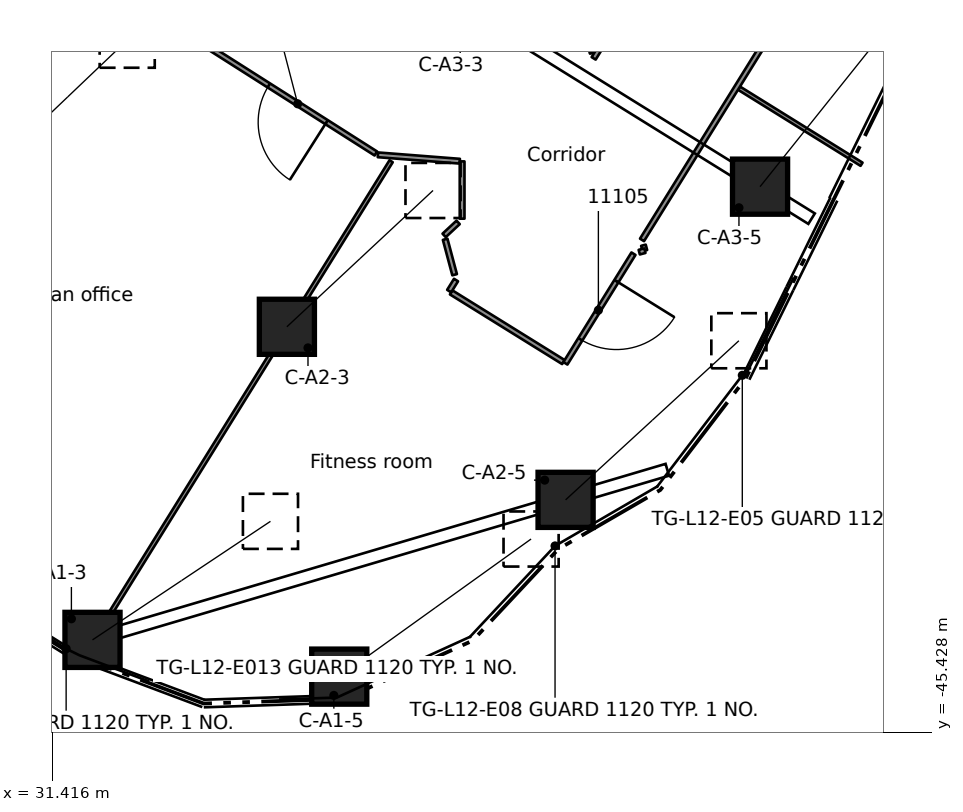
"""IFC4 building model, lengths in metres.
Left out: names, types, materials, properties, quantities, classifications, styles, units other than length and angle.
Written with IfcOpenShell. Run it as: python <this file> out.ifc"""

import sys

from ifc_helpers import new_model, si_unit, direction, frame, frame_2d, origin, origin_2d, place, context, subcontext, project, spatial, rectangle, extrude, element, fill, save


model = new_model("IFC4")
c1 = context("Model", 3, precision=1e-05, world=origin(), true_north=direction((0.0, 1.0)))
c2 = subcontext(c1, "Body", "Model", "MODEL_VIEW")
j1 = project(units=[si_unit("LENGTHUNIT", "METRE"), si_unit("PLANEANGLEUNIT", "RADIAN")], contexts=[c1])
p1 = place(None, origin())
s1 = spatial("IfcSite", under=j1, at=p1, CompositionType="ELEMENT")
p2 = place(p1, origin())
s2 = spatial("IfcBuilding", under=s1, at=p2, CompositionType="ELEMENT")
p3 = place(p2, frame((0.0, 0.0, 54.8)))
s3 = spatial("IfcBuildingStorey", under=s2, at=p3, CompositionType="ELEMENT", Elevation=54.8)
p4 = place(p3, frame((32.475, -42.992, 0.654), z_axis=(0.750792181677, 0.500045363689, 0.431585141294), x_axis=(-0.55432964242, 0.832297211058, 0.0)))
e1 = element("IfcColumn", 1, at=p4, inside=s3, PredefinedType="COLUMN", context=c2, shape_type="SweptSolid", body=[
    extrude(rectangle(XDim=1.45, YDim=1.45, at=origin_2d()), origin(), (0.0, 0.0, 1.0), 6.237),
])
p5 = place(p3, frame((38.968, -43.959, 0.666), z_axis=(0.746649911679, 0.535585988781, 0.394539678628), x_axis=(-0.58286895682, 0.812566169106, 0.0)))
e2 = element("IfcColumn", 2, at=p5, inside=s3, PredefinedType="COLUMN", context=c2, shape_type="SweptSolid", body=[
    extrude(rectangle(XDim=1.45, YDim=1.45, at=origin_2d()), origin(), (0.0, 0.0, 1.0), 6.761),
])
p6 = place(p3, frame((30.255, -30.2, 0.61), z_axis=(0.608996447685, 0.580618057931, 0.540375792862), x_axis=(-0.690042356189, 0.723768987084, 0.0)))
e3 = element("IfcColumn", 3, at=p6, inside=s3, PredefinedType="COLUMN", context=c2, shape_type="SweptSolid", body=[
    extrude(rectangle(XDim=1.45, YDim=1.45, at=origin_2d()), origin(), (0.0, 0.0, 1.0), 5.145),
])
p7 = place(p3, frame((37.59, -34.754, 0.644), z_axis=(0.650011603321, 0.606231859074, 0.45822248809), x_axis=(-0.682050250906, 0.731305309183, 0.0)))
e4 = element("IfcColumn", 4, at=p7, inside=s3, PredefinedType="COLUMN", context=c2, shape_type="SweptSolid", body=[
    extrude(rectangle(XDim=1.45, YDim=1.45, at=origin_2d()), origin(), (0.0, 0.0, 1.0), 5.917),
])
p8 = place(p3, frame((44.924, -39.308, 0.666), z_axis=(0.676410943669, 0.621108726451, 0.395843637324), x_axis=(-0.676354787689, 0.736575998231, 0.0)))
e5 = element("IfcColumn", 5, at=p8, inside=s3, PredefinedType="COLUMN", context=c2, shape_type="SweptSolid", body=[
    extrude(rectangle(XDim=1.45, YDim=1.45, at=origin_2d()), origin(), (0.0, 0.0, 1.0), 6.741),
])
p9 = place(p3, frame((27.423, -28.442, 0.609), z_axis=(0.69676588464, 0.469082356893, 0.542659234192), x_axis=(-0.558462658867, 0.829529661104, 0.0)))
e6 = element("IfcColumn", 6, at=p9, inside=s3, PredefinedType="COLUMN", context=c2, shape_type="SweptSolid", body=[
    extrude(rectangle(XDim=1.45, YDim=1.45, at=origin_2d()), origin(), (0.0, 0.0, 1.0), 5.126),
])
p10 = place(p3, frame((50.041, -31.067, 0.661), z_axis=(0.569633877133, 0.712332079471, 0.410000310463), x_axis=(-0.780992758951, 0.624540079151, 0.0)))
e7 = element("IfcColumn", 7, at=p10, inside=s3, PredefinedType="COLUMN", context=c2, shape_type="SweptSolid", body=[
    extrude(rectangle(XDim=1.45, YDim=1.45, at=origin_2d()), origin(), (0.0, 0.0, 1.0), 6.531),
])
p11 = place(p3, frame((41.755, -32.451, 0.0), z_axis=(0.0, 0.0, 1.0), x_axis=(0.257851455591, -0.966184571834, 0.0)))
e8 = element("IfcWall", 8, at=p11, inside=s3, PredefinedType="PARTITIONING", context=c2, shape_type="SweptSolid", body=[
    extrude(rectangle(XDim=0.966, YDim=0.125, at=frame_2d((0.483, 0.0))), origin(), (0.0, 0.0, 1.0), 3.58),
])
p12 = place(p3, frame((45.51, -27.123, 0.0), z_axis=(0.0, 0.0, 1.0), x_axis=(0.259479518398, -0.96574861094, 0.0)))
e9 = element("IfcWall", 9, at=p12, inside=s3, PredefinedType="PARTITIONING", context=c2, shape_type="SweptSolid", body=[
    extrude(rectangle(XDim=0.443, YDim=0.125, at=frame_2d((0.222, 0.0))), origin(), (0.0, 0.0, 1.0), 3.58),
])
p13 = place(p3, frame((46.972, -32.608, 0.0), z_axis=(0.0, 0.0, 1.0), x_axis=(0.258901994846, -0.965903596155, 0.0)))
e10 = element("IfcWall", 10, at=p13, inside=s3, PredefinedType="PARTITIONING", context=c2, shape_type="SweptSolid", body=[
    extrude(rectangle(XDim=0.147, YDim=0.125, at=frame_2d((0.074, 0.0))), origin(), (0.0, 0.0, 1.0), 3.58),
])
p14 = place(p3, frame((39.932, -30.195, 0.0), z_axis=(0.0, 0.0, 1.0), x_axis=(-0.843820070804, 0.536626208927, 0.0)))
e11 = element("IfcWall", 11, at=p14, inside=s3, PredefinedType="PARTITIONING", context=c2, shape_type="SweptSolid", body=[
    extrude(rectangle(XDim=6.464, YDim=0.125, at=frame_2d((3.232, 0.0))), origin(), (0.0, 0.0, 1.0), 3.58),
])
p15 = place(p14, frame((1.538, 0.0, 0.0)))
e12 = element("IfcOpeningElement", 12, at=p15, cuts=e11, PredefinedType="OPENING", context=c2, shape_type="SweptSolid", body=[
    extrude(rectangle(XDim=1.8, YDim=2.1, at=frame_2d((0.9, 1.05))), frame((0.0, 0.073, 0.0), z_axis=(0.0, -1.0, 0.0), x_axis=(1.0, 0.0, 0.0)), (0.0, 0.0, 1.0), 0.145),
])
p16 = place(p3, frame((41.913, -33.849, 0.0), z_axis=(0.0, 0.0, 1.0), x_axis=(0.849647763732, -0.527350621111, 0.0)))
e13 = element("IfcWall", 13, at=p16, inside=s3, PredefinedType="PARTITIONING", context=c2, shape_type="SweptSolid", body=[
    extrude(rectangle(XDim=3.475, YDim=0.125, at=frame_2d((1.738, 0.0))), origin(), (0.0, 0.0, 1.0), 3.58),
])
p17 = place(p3, frame((49.487, -28.475, 0.0), z_axis=(0.0, 0.0, 1.0), x_axis=(0.849602400196, -0.527423702143, 0.0)))
e14 = element("IfcWall", 14, at=p17, inside=s3, PredefinedType="PARTITIONING", context=c2, shape_type="SweptSolid", body=[
    extrude(rectangle(XDim=3.796, YDim=0.1, at=frame_2d((1.898, 0.0))), origin(), (0.0, 0.0, 1.0), 3.58),
])
p18 = place(p3, frame((39.985, -30.229, 0.0), z_axis=(0.0, 0.0, 1.0), x_axis=(0.996972826888, -0.077750771356, 0.0)))
e15 = element("IfcWall", 15, at=p18, inside=s3, PredefinedType="PARTITIONING", context=c2, shape_type="SweptSolid", body=[
    extrude(rectangle(XDim=2.16, YDim=0.125, at=frame_2d((1.08, 0.0))), origin(), (0.0, 0.0, 1.0), 3.58),
])
p19 = place(p3, frame((46.862, -32.79, 0.0), z_axis=(0.0, 0.0, 1.0), x_axis=(0.96686754856, 0.255278560676, 0.0)))
e16 = element("IfcWall", 16, at=p19, inside=s3, PredefinedType="PARTITIONING", context=c2, shape_type="SweptSolid", body=[
    extrude(rectangle(XDim=0.153, YDim=0.125, at=frame_2d((0.077, 0.0))), origin(), (0.0, 0.0, 1.0), 3.58),
])
p20 = place(p3, frame((41.728, -32.35, 0.0), z_axis=(0.0, 0.0, 1.0), x_axis=(0.731426379857, 0.681920413868, 0.0)))
e17 = element("IfcWall", 17, at=p20, inside=s3, PredefinedType="PARTITIONING", context=c2, shape_type="SweptSolid", body=[
    extrude(rectangle(XDim=0.503, YDim=0.125, at=frame_2d((0.251, 0.0))), origin(), (0.0, 0.0, 1.0), 3.58),
])
p21 = place(p3, frame((41.86, -33.815, 0.0), z_axis=(0.0, 0.0, 1.0), x_axis=(0.527948010294, 0.849276691324, 0.0)))
e18 = element("IfcWall", 18, at=p21, inside=s3, PredefinedType="PARTITIONING", context=c2, shape_type="SweptSolid", body=[
    extrude(rectangle(XDim=0.343, YDim=0.125, at=frame_2d((0.171, 0.0))), origin(), (0.0, 0.0, 1.0), 3.58),
])
p22 = place(p3, frame((45.662, -27.691, 0.0), z_axis=(0.0, 0.0, 1.0), x_axis=(0.527888562737, 0.849313643674, 0.0)))
e19 = element("IfcWall", 19, at=p22, inside=s3, PredefinedType="PARTITIONING", context=c2, shape_type="SweptSolid", body=[
    extrude(rectangle(XDim=2.716, YDim=0.125, at=frame_2d((1.358, 0.0))), origin(), (0.0, 0.0, 1.0), 3.58),
])
p23 = place(p3, frame((46.71, -32.831, 0.0), z_axis=(0.0, 0.0, 1.0), x_axis=(-0.527559761844, -0.849517920755, 0.0)))
e20 = element("IfcWall", 20, at=p23, inside=s3, PredefinedType="PARTITIONING", context=c2, shape_type="SweptSolid", body=[
    extrude(rectangle(XDim=3.395, YDim=0.125, at=frame_2d((1.698, 0.0))), origin(), (0.0, 0.0, 1.0), 3.58),
])
p24 = place(p23, frame((0.85, 0.0, 0.0)))
e21 = element("IfcOpeningElement", 21, at=p24, cuts=e20, PredefinedType="OPENING", context=c2, shape_type="SweptSolid", body=[
    extrude(rectangle(XDim=1.8, YDim=2.1, at=frame_2d((0.9, 1.05))), frame((0.0, 0.073, 0.0), z_axis=(0.0, -1.0, 0.0), x_axis=(1.0, 0.0, 0.0)), (0.0, 0.0, 1.0), 0.145),
])
p25 = place(p3, frame((46.935, -32.468, 0.0), z_axis=(0.0, 0.0, 1.0), x_axis=(0.527420544761, 0.849604360255, 0.0)))
e22 = element("IfcWall", 22, at=p25, inside=s3, PredefinedType="PARTITIONING", context=c2, shape_type="SweptSolid", body=[
    extrude(rectangle(XDim=9.482, YDim=0.125, at=frame_2d((4.741, 0.0))), origin(), (0.0, 0.0, 1.0), 3.58),
])
p26 = place(p3, frame((32.082, -43.688, 0.0), z_axis=(0.0, 0.0, 1.0), x_axis=(0.527454544874, 0.849583252596, 0.0)))
e23 = element("IfcWall", 23, at=p26, inside=s3, PredefinedType="PARTITIONING", context=c2, shape_type="SweptSolid", body=[
    extrude(rectangle(XDim=15.643, YDim=0.1, at=frame_2d((7.822, 0.0))), origin(), (0.0, 0.0, 1.0), 3.58),
])
p27 = place(p3, frame((42.201, -31.909, 0.0), z_axis=(0.0, 0.0, 1.0), x_axis=(0.0, 1.0, 0.0)))
e24 = element("IfcWall", 24, at=p27, inside=s3, PredefinedType="PARTITIONING", context=c2, shape_type="SweptSolid", body=[
    extrude(rectangle(XDim=1.507, YDim=0.125, at=frame_2d((0.753, 0.0))), origin(), (0.0, 0.0, 1.0), 3.58),
])
p28 = place(p24, origin())
e25 = element("IfcDoor", 25, at=p28, inside=s3, OperationType="DOUBLE_DOOR_SINGLE_SWING", PredefinedType="DOOR", context=c2, shape_type="SweptSolid", body=[
    extrude(rectangle(XDim=1.8, YDim=2.1, at=frame_2d((0.9, 1.05))), frame((0.0, 0.025, 0.0), z_axis=(0.0, -1.0, 0.0), x_axis=(1.0, 0.0, 0.0)), (0.0, 0.0, 1.0), 0.05),
])
fill(e21, e25)
p29 = place(p15, origin())
e26 = element("IfcDoor", 26, at=p29, inside=s3, OperationType="DOUBLE_DOOR_SINGLE_SWING", PredefinedType="DOOR", context=c2, shape_type="SweptSolid", body=[
    extrude(rectangle(XDim=1.8, YDim=2.1, at=frame_2d((0.9, 1.05))), frame((0.0, 0.025, 0.0), z_axis=(0.0, -1.0, 0.0), x_axis=(1.0, 0.0, 0.0)), (0.0, 0.0, 1.0), 0.05),
])
fill(e12, e26)
save(model, sys.argv[1])
